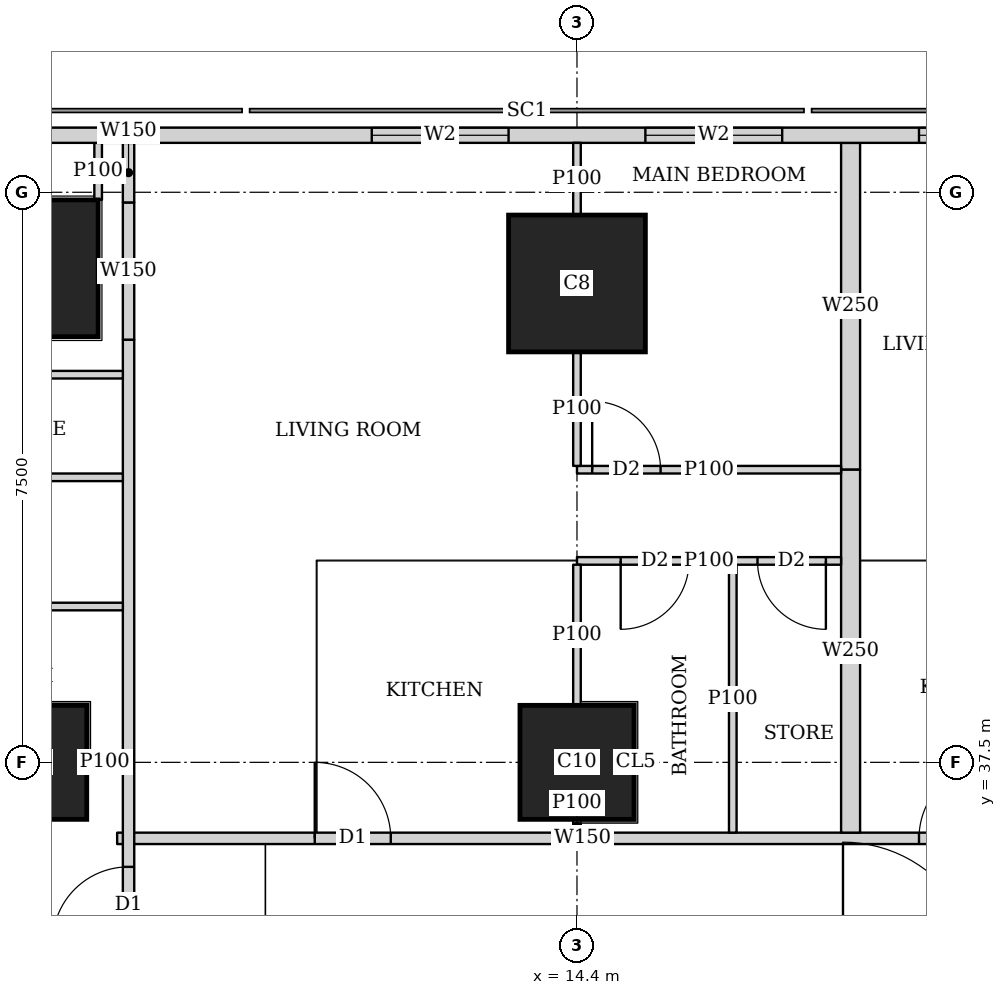
"""IFC4 building model, lengths in metres.
Left out: names, types, materials, properties, quantities, classifications, styles, units other than length and angle.
Written with IfcOpenShell. Run it as: python <this file> out.ifc"""

import sys

from ifc_helpers import new_model, si_unit, direction, frame, frame_2d, origin, origin_2d, place, context, subcontext, project, spatial, rectangle, extrude, element, fill, save


model = new_model("IFC4")
c1 = context("Model", 3, precision=1e-05, world=origin(), true_north=direction((0.0, 1.0)))
c2 = subcontext(c1, "Body", "Model", "MODEL_VIEW")
j1 = project(units=[si_unit("LENGTHUNIT", "METRE"), si_unit("PLANEANGLEUNIT", "RADIAN")], contexts=[c1])
p1 = place(None, origin())
s1 = spatial("IfcSite", under=j1, at=p1, CompositionType="ELEMENT")
p2 = place(p1, origin())
s2 = spatial("IfcBuilding", under=s1, at=p2, CompositionType="ELEMENT")
p3 = place(p2, frame((0.0, 0.0, 135.8)))
s3 = spatial("IfcBuildingStorey", under=s2, at=p3, CompositionType="ELEMENT", Elevation=135.8)
for number, where, z_axis, x_axis in (
    (1, (7.2, 37.5, 0.0), (0.0, 0.0, 1.0), (1.0, 0.0, 0.0)),
    (2, (14.4, 37.5, 0.0), (0.0, 0.0, 1.0), (1.0, 0.0, 0.0)),
):
    element("IfcColumn", number, at=place(p3, frame(where, z_axis=z_axis, x_axis=x_axis)), inside=s3, PredefinedType="COLUMN", context=c2, shape_type="SweptSolid", body=[
        extrude(rectangle(XDim=1.5, YDim=1.5, at=origin_2d()), origin(), (0.0, 0.0, 1.0), 3.75),
    ])
for number, where, z_axis, x_axis in (
    (3, (7.2, 44.0, 0.0), (0.0, 0.0, 1.0), (1.0, 0.0, 0.0)),
    (4, (14.4, 43.8, 0.0), (0.0, 0.0, 1.0), (1.0, 0.0, 0.0)),
):
    element("IfcColumn", number, at=place(p3, frame(where, z_axis=z_axis, x_axis=x_axis)), inside=s3, PredefinedType="COLUMN", context=c2, shape_type="SweptSolid", body=[
        extrude(rectangle(XDim=1.8, YDim=1.8, at=origin_2d()), origin(), (0.0, 0.0, 1.0), 3.75),
    ])
p4 = place(p3, frame((40.106, 45.75, 0.0), z_axis=(0.0, 0.0, 1.0), x_axis=(-1.0, 0.0, 0.0)))
e5 = element("IfcWall", 5, at=p4, inside=s3, PredefinedType="SOLIDWALL", context=c2, shape_type="SweptSolid", body=[
    extrude(rectangle(XDim=37.943, YDim=0.2, at=frame_2d((18.971, 0.0))), origin(), (0.0, 0.0, 1.0), 3.5),
])
p5 = place(p4, frame((8.606, 0.0, 0.9)))
e6 = element("IfcOpeningElement", 6, at=p5, cuts=e5, PredefinedType="OPENING", context=c2, shape_type="SweptSolid", body=[
    extrude(rectangle(XDim=1.8, YDim=1.5, at=frame_2d((0.9, 0.75))), frame((0.0, 0.11, 0.0), z_axis=(0.0, -1.0, 0.0), x_axis=(1.0, 0.0, 0.0)), (0.0, 0.0, 1.0), 0.22),
])
p6 = place(p4, frame((12.206, 0.0, 0.9)))
e7 = element("IfcOpeningElement", 7, at=p6, cuts=e5, PredefinedType="OPENING", context=c2, shape_type="SweptSolid", body=[
    extrude(rectangle(XDim=1.8, YDim=1.5, at=frame_2d((0.9, 0.75))), frame((0.0, 0.11, 0.0), z_axis=(0.0, -1.0, 0.0), x_axis=(1.0, 0.0, 0.0)), (0.0, 0.0, 1.0), 0.22),
])
p7 = place(p4, frame((15.806, 0.0, 0.9)))
e8 = element("IfcOpeningElement", 8, at=p7, cuts=e5, PredefinedType="OPENING", context=c2, shape_type="SweptSolid", body=[
    extrude(rectangle(XDim=1.8, YDim=1.5, at=frame_2d((0.9, 0.75))), frame((0.0, 0.11, 0.0), z_axis=(0.0, -1.0, 0.0), x_axis=(1.0, 0.0, 0.0)), (0.0, 0.0, 1.0), 0.22),
])
p8 = place(p4, frame((19.406, 0.0, 0.9)))
e9 = element("IfcOpeningElement", 9, at=p8, cuts=e5, PredefinedType="OPENING", context=c2, shape_type="SweptSolid", body=[
    extrude(rectangle(XDim=1.8, YDim=1.5, at=frame_2d((0.9, 0.75))), frame((0.0, 0.11, 0.0), z_axis=(0.0, -1.0, 0.0), x_axis=(1.0, 0.0, 0.0)), (0.0, 0.0, 1.0), 0.22),
])
p9 = place(p4, frame((23.006, 0.0, 0.9)))
e10 = element("IfcOpeningElement", 10, at=p9, cuts=e5, PredefinedType="OPENING", context=c2, shape_type="SweptSolid", body=[
    extrude(rectangle(XDim=1.8, YDim=1.5, at=frame_2d((0.9, 0.75))), frame((0.0, 0.11, 0.0), z_axis=(0.0, -1.0, 0.0), x_axis=(1.0, 0.0, 0.0)), (0.0, 0.0, 1.0), 0.22),
])
p10 = place(p4, frame((26.606, 0.0, 0.9)))
e11 = element("IfcOpeningElement", 11, at=p10, cuts=e5, PredefinedType="OPENING", context=c2, shape_type="SweptSolid", body=[
    extrude(rectangle(XDim=1.8, YDim=1.5, at=frame_2d((0.9, 0.75))), frame((0.0, 0.11, 0.0), z_axis=(0.0, -1.0, 0.0), x_axis=(1.0, 0.0, 0.0)), (0.0, 0.0, 1.0), 0.22),
])
p11 = place(p3, frame((8.5, 1.964, 0.0), z_axis=(0.0, 0.0, 1.0), x_axis=(0.0, 1.0, 0.0)))
e12 = element("IfcWall", 12, at=p11, inside=s3, PredefinedType="SOLIDWALL", context=c2, shape_type="SweptSolid", body=[
    extrude(rectangle(XDim=41.097, YDim=0.15, at=frame_2d((20.548, 0.0))), origin(), (0.0, 0.0, 1.0), 3.5),
])
p12 = place(p11, frame((6.911, 0.0, 0.0)))
e13 = element("IfcOpeningElement", 13, at=p12, cuts=e12, PredefinedType="OPENING", context=c2, shape_type="SweptSolid", body=[
    extrude(rectangle(XDim=1.0, YDim=2.1, at=frame_2d((0.5, 1.05))), frame((0.0, 0.085, 0.0), z_axis=(0.0, -1.0, 0.0), x_axis=(1.0, 0.0, 0.0)), (0.0, 0.0, 1.0), 0.17),
])
p13 = place(p11, frame((10.661, 0.0, 0.0)))
e14 = element("IfcOpeningElement", 14, at=p13, cuts=e12, PredefinedType="OPENING", context=c2, shape_type="SweptSolid", body=[
    extrude(rectangle(XDim=1.0, YDim=2.1, at=frame_2d((0.5, 1.05))), frame((0.0, 0.085, 0.0), z_axis=(0.0, -1.0, 0.0), x_axis=(1.0, 0.0, 0.0)), (0.0, 0.0, 1.0), 0.17),
])
p14 = place(p11, frame((25.661, 0.0, 0.0)))
e15 = element("IfcOpeningElement", 15, at=p14, cuts=e12, PredefinedType="OPENING", context=c2, shape_type="SweptSolid", body=[
    extrude(rectangle(XDim=1.0, YDim=2.1, at=frame_2d((0.5, 1.05))), frame((0.0, 0.085, 0.0), z_axis=(0.0, -1.0, 0.0), x_axis=(1.0, 0.0, 0.0)), (0.0, 0.0, 1.0), 0.17),
])
p15 = place(p11, frame((33.161, 0.0, 0.0)))
e16 = element("IfcOpeningElement", 16, at=p15, cuts=e12, PredefinedType="OPENING", context=c2, shape_type="SweptSolid", body=[
    extrude(rectangle(XDim=1.0, YDim=2.1, at=frame_2d((0.5, 1.05))), frame((0.0, 0.085, 0.0), z_axis=(0.0, -1.0, 0.0), x_axis=(1.0, 0.0, 0.0)), (0.0, 0.0, 1.0), 0.17),
])
p16 = place(p3, frame((8.5, 43.061, 0.0), z_axis=(0.0, 0.0, 1.0), x_axis=(0.0, 1.0, 0.0)))
e17 = element("IfcWall", 17, at=p16, inside=s3, PredefinedType="SOLIDWALL", context=c2, shape_type="SweptSolid", body=[
    extrude(rectangle(XDim=1.805, YDim=0.15, at=frame_2d((0.902, 0.0))), origin(), (0.0, 0.0, 1.0), 2.1),
])
p17 = place(p3, frame((8.5, 44.866, 0.0), z_axis=(0.0, 0.0, 1.0), x_axis=(0.0, 1.0, 0.0)))
e18 = element("IfcWall", 18, at=p17, inside=s3, PredefinedType="SOLIDWALL", context=c2, shape_type="SweptSolid", body=[
    extrude(rectangle(XDim=0.784, YDim=0.15, at=frame_2d((0.392, 0.0))), origin(), (0.0, 0.0, 1.0), 3.5),
])
p18 = place(p3, frame((8.35, 36.5, 0.0), z_axis=(0.0, 0.0, 1.0), x_axis=(1.0, 0.0, 0.0)))
e19 = element("IfcWall", 19, at=p18, inside=s3, PredefinedType="SOLIDWALL", context=c2, shape_type="SweptSolid", body=[
    extrude(rectangle(XDim=12.249, YDim=0.15, at=frame_2d((6.125, 0.0))), origin(), (0.0, 0.0, 1.0), 3.5),
])
p19 = place(p18, frame((2.6, 0.0, 0.0)))
e20 = element("IfcOpeningElement", 20, at=p19, cuts=e19, PredefinedType="OPENING", context=c2, shape_type="SweptSolid", body=[
    extrude(rectangle(XDim=1.0, YDim=2.1, at=frame_2d((0.5, 1.05))), frame((0.0, 0.085, 0.0), z_axis=(0.0, -1.0, 0.0), x_axis=(1.0, 0.0, 0.0)), (0.0, 0.0, 1.0), 0.17),
])
p20 = place(p18, frame((10.55, 0.0, 0.0)))
e21 = element("IfcOpeningElement", 21, at=p20, cuts=e19, PredefinedType="OPENING", context=c2, shape_type="SweptSolid", body=[
    extrude(rectangle(XDim=1.0, YDim=2.1, at=frame_2d((0.5, 1.05))), frame((0.0, 0.085, 0.0), z_axis=(0.0, -1.0, 0.0), x_axis=(1.0, 0.0, 0.0)), (0.0, 0.0, 1.0), 0.17),
])
p21 = place(p3, frame((8.1, 45.65, 0.0), z_axis=(0.0, 0.0, 1.0), x_axis=(0.0, -1.0, 0.0)))
e22 = element("IfcWall", 22, at=p21, inside=s3, PredefinedType="PARTITIONING", context=c2, shape_type="SweptSolid", body=[
    extrude(rectangle(XDim=0.749, YDim=0.1, at=frame_2d((0.375, 0.0))), origin(), (0.0, 0.0, 1.0), 3.5),
])
p22 = place(p3, frame((7.951, 37.5, 0.0), z_axis=(0.0, 0.0, 1.0), x_axis=(1.0, 0.0, 0.0)))
e23 = element("IfcWall", 23, at=p22, inside=s3, PredefinedType="PARTITIONING", context=c2, shape_type="SweptSolid", body=[
    extrude(rectangle(XDim=0.474, YDim=0.1, at=frame_2d((0.237, 0.0))), origin(), (0.0, 0.0, 1.0), 3.5),
])
for number, where, z_axis, x_axis in (
    (24, (4.9, 41.25, 0.0), (0.0, 0.0, 1.0), (1.0, 0.0, 0.0)),
    (25, (4.9, 39.55, 0.0), (0.0, 0.0, 1.0), (1.0, 0.0, 0.0)),
):
    element("IfcWall", number, at=place(p3, frame(where, z_axis=z_axis, x_axis=x_axis)), inside=s3, PredefinedType="PARTITIONING", context=c2, shape_type="SweptSolid", body=[
        extrude(rectangle(XDim=3.525, YDim=0.1, at=frame_2d((1.763, 0.0))), origin(), (0.0, 0.0, 1.0), 3.5),
    ])
p23 = place(p3, frame((14.4, 41.35, 0.0), z_axis=(0.0, 0.0, 1.0), x_axis=(1.0, 0.0, 0.0)))
e26 = element("IfcWall", 26, at=p23, inside=s3, PredefinedType="PARTITIONING", context=c2, shape_type="SweptSolid", body=[
    extrude(rectangle(XDim=3.475, YDim=0.1, at=frame_2d((1.738, 0.0))), origin(), (0.0, 0.0, 1.0), 3.5),
])
p24 = place(p23, frame((0.2, 0.0, 0.0)))
e27 = element("IfcOpeningElement", 27, at=p24, cuts=e26, PredefinedType="OPENING", context=c2, shape_type="SweptSolid", body=[
    extrude(rectangle(XDim=0.9, YDim=2.1, at=frame_2d((0.45, 1.05))), frame((0.0, 0.06, 0.0), z_axis=(0.0, -1.0, 0.0), x_axis=(1.0, 0.0, 0.0)), (0.0, 0.0, 1.0), 0.12),
])
p25 = place(p3, frame((14.4, 40.15, 0.0), z_axis=(0.0, 0.0, 1.0), x_axis=(1.0, 0.0, 0.0)))
e28 = element("IfcWall", 28, at=p25, inside=s3, PredefinedType="PARTITIONING", context=c2, shape_type="SweptSolid", body=[
    extrude(rectangle(XDim=3.475, YDim=0.1, at=frame_2d((1.738, 0.0))), origin(), (0.0, 0.0, 1.0), 3.5),
])
p26 = place(p25, frame((0.575, 0.0, 0.0)))
e29 = element("IfcOpeningElement", 29, at=p26, cuts=e28, PredefinedType="OPENING", context=c2, shape_type="SweptSolid", body=[
    extrude(rectangle(XDim=0.9, YDim=2.1, at=frame_2d((0.45, 1.05))), frame((0.0, 0.06, 0.0), z_axis=(0.0, -1.0, 0.0), x_axis=(1.0, 0.0, 0.0)), (0.0, 0.0, 1.0), 0.12),
])
p27 = place(p25, frame((2.375, 0.0, 0.0)))
e30 = element("IfcOpeningElement", 30, at=p27, cuts=e28, PredefinedType="OPENING", context=c2, shape_type="SweptSolid", body=[
    extrude(rectangle(XDim=0.9, YDim=2.1, at=frame_2d((0.45, 1.05))), frame((0.0, 0.06, 0.0), z_axis=(0.0, -1.0, 0.0), x_axis=(1.0, 0.0, 0.0)), (0.0, 0.0, 1.0), 0.12),
])
p28 = place(p3, frame((14.4, 41.4, 0.0), z_axis=(0.0, 0.0, 1.0), x_axis=(0.0, 1.0, 0.0)))
e31 = element("IfcWall", 31, at=p28, inside=s3, PredefinedType="PARTITIONING", context=c2, shape_type="SweptSolid", body=[
    extrude(rectangle(XDim=1.499, YDim=0.1, at=frame_2d((0.75, 0.0))), origin(), (0.0, 0.0, 1.0), 3.5),
])
p29 = place(p3, frame((14.4, 44.701, 0.0), z_axis=(0.0, 0.0, 1.0), x_axis=(0.0, 1.0, 0.0)))
e32 = element("IfcWall", 32, at=p29, inside=s3, PredefinedType="PARTITIONING", context=c2, shape_type="SweptSolid", body=[
    extrude(rectangle(XDim=0.949, YDim=0.1, at=frame_2d((0.475, 0.0))), origin(), (0.0, 0.0, 1.0), 3.5),
])
p30 = place(p3, frame((14.4, 36.575, 0.0), z_axis=(0.0, 0.0, 1.0), x_axis=(0.0, 1.0, 0.0)))
e33 = element("IfcWall", 33, at=p30, inside=s3, PredefinedType="PARTITIONING", context=c2, shape_type="SweptSolid", body=[
    extrude(rectangle(XDim=0.174, YDim=0.1, at=frame_2d((0.087, 0.0))), origin(), (0.0, 0.0, 1.0), 3.5),
])
p31 = place(p3, frame((14.4, 38.251, 0.0), z_axis=(0.0, 0.0, 1.0), x_axis=(0.0, 1.0, 0.0)))
e34 = element("IfcWall", 34, at=p31, inside=s3, PredefinedType="PARTITIONING", context=c2, shape_type="SweptSolid", body=[
    extrude(rectangle(XDim=1.849, YDim=0.1, at=frame_2d((0.925, 0.0))), origin(), (0.0, 0.0, 1.0), 3.5),
])
p32 = place(p3, frame((16.45, 36.575, 0.0), z_axis=(0.0, 0.0, 1.0), x_axis=(0.0, 1.0, 0.0)))
e35 = element("IfcWall", 35, at=p32, inside=s3, PredefinedType="PARTITIONING", context=c2, shape_type="SweptSolid", body=[
    extrude(rectangle(XDim=3.525, YDim=0.1, at=frame_2d((1.763, 0.0))), origin(), (0.0, 0.0, 1.0), 3.5),
])
p33 = place(p3, frame((18.0, 41.35, 0.0), z_axis=(0.0, 0.0, 1.0), x_axis=(0.0, 1.0, 0.0)))
e36 = element("IfcWall", 36, at=p33, inside=s3, PredefinedType="SOLIDWALL", context=c2, shape_type="SweptSolid", body=[
    extrude(rectangle(XDim=4.3, YDim=0.25, at=frame_2d((2.15, 0.0))), origin(), (0.0, 0.0, 1.0), 2.1),
])
p34 = place(p3, frame((18.0, 36.575, 0.0), z_axis=(0.0, 0.0, 1.0), x_axis=(0.0, 1.0, 0.0)))
e37 = element("IfcWall", 37, at=p34, inside=s3, PredefinedType="SOLIDWALL", context=c2, shape_type="SweptSolid", body=[
    extrude(rectangle(XDim=4.775, YDim=0.25, at=frame_2d((2.388, 0.0))), origin(), (0.0, 0.0, 1.0), 3.5),
])
p35 = place(p3, frame((8.425, 42.6, 0.0), z_axis=(0.0, 0.0, 1.0), x_axis=(-1.0, 0.0, 0.0)))
e38 = element("IfcWall", 38, at=p35, inside=s3, PredefinedType="PARTITIONING", context=c2, shape_type="SweptSolid", body=[
    extrude(rectangle(XDim=3.022, YDim=0.1, at=frame_2d((1.511, 0.0))), origin(), (0.0, 0.0, 1.0), 3.5),
])
p36 = place(p35, frame((1.95, 0.0, 0.0)))
e39 = element("IfcOpeningElement", 39, at=p36, cuts=e38, PredefinedType="OPENING", context=c2, shape_type="SweptSolid", body=[
    extrude(rectangle(XDim=0.9, YDim=2.1, at=frame_2d((0.45, 1.05))), frame((0.0, 0.06, 0.0), z_axis=(0.0, -1.0, 0.0), x_axis=(1.0, 0.0, 0.0)), (0.0, 0.0, 1.0), 0.12),
])
p37 = place(p8, origin())
e40 = element("IfcWindow", 40, at=p37, inside=s3, PartitioningType="SINGLE_PANEL", PredefinedType="WINDOW", context=c2, shape_type="SweptSolid", body=[
    extrude(rectangle(XDim=1.8, YDim=1.5, at=frame_2d((0.9, 0.75))), frame((0.0, 0.03, 0.0), z_axis=(0.0, -1.0, 0.0), x_axis=(1.0, 0.0, 0.0)), (0.0, 0.0, 1.0), 0.06),
])
fill(e9, e40)
p38 = place(p9, origin())
e41 = element("IfcWindow", 41, at=p38, inside=s3, PartitioningType="SINGLE_PANEL", PredefinedType="WINDOW", context=c2, shape_type="SweptSolid", body=[
    extrude(rectangle(XDim=1.8, YDim=1.5, at=frame_2d((0.9, 0.75))), frame((0.0, 0.03, 0.0), z_axis=(0.0, -1.0, 0.0), x_axis=(1.0, 0.0, 0.0)), (0.0, 0.0, 1.0), 0.06),
])
fill(e10, e41)
p39 = place(p10, origin())
e42 = element("IfcWindow", 42, at=p39, inside=s3, PartitioningType="SINGLE_PANEL", PredefinedType="WINDOW", context=c2, shape_type="SweptSolid", body=[
    extrude(rectangle(XDim=1.8, YDim=1.5, at=frame_2d((0.9, 0.75))), frame((0.0, 0.03, 0.0), z_axis=(0.0, -1.0, 0.0), x_axis=(1.0, 0.0, 0.0)), (0.0, 0.0, 1.0), 0.06),
])
fill(e11, e42)
p40 = place(p15, origin())
e43 = element("IfcDoor", 43, at=p40, inside=s3, OperationType="SINGLE_SWING_LEFT", PredefinedType="DOOR", context=c2, shape_type="SweptSolid", body=[
    extrude(rectangle(XDim=1.0, YDim=2.1, at=frame_2d((0.5, 1.05))), frame((0.0, 0.025, 0.0), z_axis=(0.0, -1.0, 0.0), x_axis=(1.0, 0.0, 0.0)), (0.0, 0.0, 1.0), 0.05),
])
fill(e16, e43)
p41 = place(p24, origin())
e44 = element("IfcDoor", 44, at=p41, inside=s3, OperationType="SINGLE_SWING_LEFT", PredefinedType="DOOR", context=c2, shape_type="SweptSolid", body=[
    extrude(rectangle(XDim=0.9, YDim=2.1, at=frame_2d((0.45, 1.05))), frame((0.0, 0.025, 0.0), z_axis=(0.0, -1.0, 0.0), x_axis=(1.0, 0.0, 0.0)), (0.0, 0.0, 1.0), 0.05),
])
fill(e27, e44)
p42 = place(p26, origin())
e45 = element("IfcDoor", 45, at=p42, inside=s3, OperationType="SINGLE_SWING_RIGHT", PredefinedType="DOOR", context=c2, shape_type="SweptSolid", body=[
    extrude(rectangle(XDim=0.9, YDim=2.1, at=frame_2d((0.45, 1.05))), frame((0.0, 0.025, 0.0), z_axis=(0.0, -1.0, 0.0), x_axis=(1.0, 0.0, 0.0)), (0.0, 0.0, 1.0), 0.05),
])
fill(e29, e45)
p43 = place(p27, origin())
e46 = element("IfcDoor", 46, at=p43, inside=s3, OperationType="SINGLE_SWING_LEFT", PredefinedType="DOOR", context=c2, shape_type="SweptSolid", body=[
    extrude(rectangle(XDim=0.9, YDim=2.1, at=frame_2d((0.45, 1.05))), frame((0.0, 0.025, 0.0), z_axis=(0.0, -1.0, 0.0), x_axis=(1.0, 0.0, 0.0)), (0.0, 0.0, 1.0), 0.05),
])
fill(e30, e46)
p44 = place(p19, origin())
e47 = element("IfcDoor", 47, at=p44, inside=s3, OperationType="SINGLE_SWING_LEFT", PredefinedType="DOOR", context=c2, shape_type="SweptSolid", body=[
    extrude(rectangle(XDim=1.0, YDim=2.1, at=frame_2d((0.5, 1.05))), frame((0.0, 0.025, 0.0), z_axis=(0.0, -1.0, 0.0), x_axis=(1.0, 0.0, 0.0)), (0.0, 0.0, 1.0), 0.05),
])
fill(e20, e47)
p45 = place(p20, origin())
e48 = element("IfcDoor", 48, at=p45, inside=s3, OperationType="SINGLE_SWING_RIGHT", PredefinedType="DOOR", context=c2, shape_type="SweptSolid", body=[
    extrude(rectangle(XDim=1.0, YDim=2.1, at=frame_2d((0.5, 1.05))), frame((0.0, 0.025, 0.0), z_axis=(0.0, -1.0, 0.0), x_axis=(1.0, 0.0, 0.0)), (0.0, 0.0, 1.0), 0.05),
])
fill(e21, e48)
save(model, sys.argv[1])
